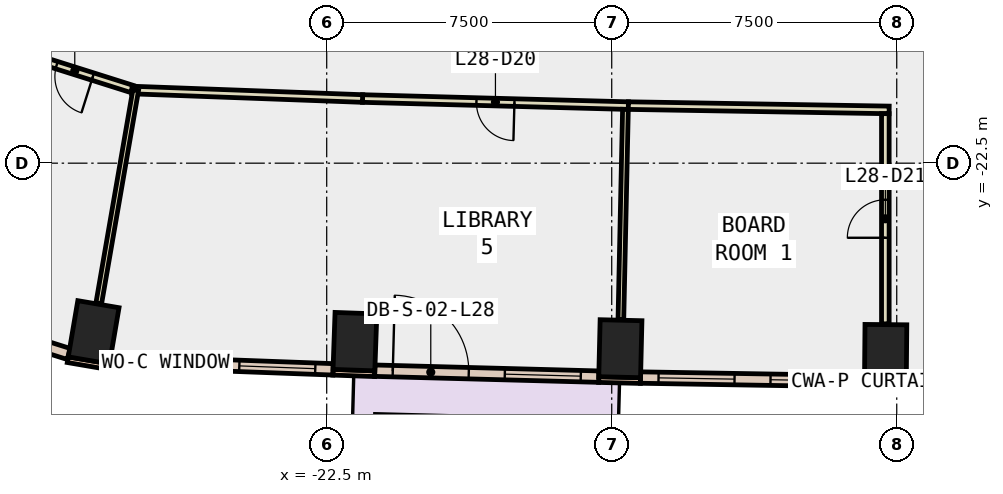
"""IFC4 building model, lengths in metres.
Left out: names, types, materials, properties, quantities, classifications, styles, units other than length and angle.
Written with IfcOpenShell. Run it as: python <this file> out.ifc"""

import sys

from ifc_helpers import new_model, si_unit, direction, frame, frame_2d, origin, origin_2d, place, context, subcontext, project, spatial, rectangle, extrude, element, fill, save


model = new_model("IFC4")
c1 = context("Model", 3, precision=1e-05, world=origin(), true_north=direction((0.0, 1.0)))
c2 = subcontext(c1, "Body", "Model", "MODEL_VIEW")
j1 = project(units=[si_unit("LENGTHUNIT", "METRE"), si_unit("PLANEANGLEUNIT", "RADIAN")], contexts=[c1])
p1 = place(None, origin())
s1 = spatial("IfcSite", under=j1, at=p1, CompositionType="ELEMENT")
p2 = place(p1, origin())
s2 = spatial("IfcBuilding", under=s1, at=p2, CompositionType="ELEMENT")
p3 = place(p2, frame((0.0, 0.0, 128.6)))
s3 = spatial("IfcBuildingStorey", under=s2, at=p3, CompositionType="ELEMENT", Elevation=128.6)
for number, where, z_axis, x_axis in (
    (1, (-28.633, -26.95, -0.4), (0.0, 0.0, 1.0), (-0.986, 0.168, 0.0)),
    (2, (-21.757, -27.196, -0.4), (0.0, 0.0, 1.0), (-0.999, 0.035, 0.0)),
    (3, (-14.773, -27.382, -0.4), (0.0, 0.0, 1.0), (-1.0, 0.024, 0.0)),
    (4, (-7.792, -27.498, -0.4), (0.0, 0.0, 1.0), (-1.0, 0.009, 0.0)),
):
    element("IfcColumn", number, at=place(p3, frame(where, z_axis=z_axis, x_axis=x_axis)), inside=s3, PredefinedType="COLUMN", context=c2, shape_type="SweptSolid", body=[
        extrude(rectangle(XDim=1.1, YDim=1.5, at=origin_2d()), origin(), (0.0, 0.0, 1.0), 4.0),
    ])
p4 = place(p3, frame((-29.314, -27.671, 0.0), z_axis=(0.0, 0.0, 1.0), x_axis=(0.985763338892, -0.168138751323, 0.0)))
e5 = element("IfcWall", 5, at=p4, inside=s3, PredefinedType="STANDARD", context=c2, shape_type="SweptSolid", body=[
    extrude(rectangle(XDim=1.101, YDim=0.15, at=frame_2d((0.55, 0.0))), origin(), (0.0, 0.0, 1.0), 3.6),
])
p5 = place(p3, frame((-22.336, -28.001, 0.0), z_axis=(0.0, 0.0, 1.0), x_axis=(0.999368780235, -0.035525217693, 0.0)))
e6 = element("IfcWall", 6, at=p5, inside=s3, PredefinedType="STANDARD", context=c2, shape_type="SweptSolid", body=[
    extrude(rectangle(XDim=1.1, YDim=0.15, at=frame_2d((0.55, 0.0))), origin(), (0.0, 0.0, 1.0), 3.6),
])
p6 = place(p3, frame((-15.343, -28.194, 0.0), z_axis=(0.0, 0.0, 1.0), x_axis=(0.999723421029, -0.023517683673, 0.0)))
e7 = element("IfcWall", 7, at=p6, inside=s3, PredefinedType="STANDARD", context=c2, shape_type="SweptSolid", body=[
    extrude(rectangle(XDim=1.1, YDim=0.15, at=frame_2d((0.55, 0.0))), origin(), (0.0, 0.0, 1.0), 3.6),
])
p7 = place(p3, frame((-8.349, -28.318, 0.0), z_axis=(0.0, 0.0, 1.0), x_axis=(0.999960601295, -0.008876703074, 0.0)))
e8 = element("IfcWall", 8, at=p7, inside=s3, PredefinedType="STANDARD", context=c2, shape_type="SweptSolid", body=[
    extrude(rectangle(XDim=1.1, YDim=0.15, at=frame_2d((0.55, 0.0))), origin(), (0.0, 0.0, 1.0), 3.6),
])
p8 = place(p3, frame((-28.205, -27.708, 0.0), z_axis=(0.0, 0.0, 1.0), x_axis=(0.999317846462, -0.036930228031, 0.0)))
e9 = element("IfcWall", 9, at=p8, inside=s3, PredefinedType="STANDARD", context=c2, shape_type="SweptSolid", body=[
    extrude(rectangle(XDim=5.877, YDim=0.3, at=frame_2d((2.938, 0.0))), origin(), (0.0, 0.0, 1.0), 3.6),
])
p9 = place(p8, frame((0.469, 0.0, 0.9)))
e10 = element("IfcOpeningElement", 10, at=p9, cuts=e9, PredefinedType="OPENING", context=c2, shape_type="SweptSolid", body=[
    extrude(rectangle(XDim=2.0, YDim=2.6, at=frame_2d((1.0, 1.3))), frame((0.0, 0.16, 0.0), z_axis=(0.0, -1.0, 0.0), x_axis=(1.0, 0.0, 0.0)), (0.0, 0.0, 1.0), 0.32),
])
p10 = place(p8, frame((3.408, 0.0, 0.9)))
e11 = element("IfcOpeningElement", 11, at=p10, cuts=e9, PredefinedType="OPENING", context=c2, shape_type="SweptSolid", body=[
    extrude(rectangle(XDim=2.0, YDim=2.6, at=frame_2d((1.0, 1.3))), frame((0.0, 0.16, 0.0), z_axis=(0.0, -1.0, 0.0), x_axis=(1.0, 0.0, 0.0)), (0.0, 0.0, 1.0), 0.32),
])
p11 = place(p3, frame((-21.235, -27.96, 0.0), z_axis=(0.0, 0.0, 1.0), x_axis=(0.999645618819, -0.026620232457, 0.0)))
e12 = element("IfcWall", 12, at=p11, inside=s3, PredefinedType="STANDARD", context=c2, shape_type="SweptSolid", body=[
    extrude(rectangle(XDim=5.897, YDim=0.3, at=frame_2d((2.949, 0.0))), origin(), (0.0, 0.0, 1.0), 3.6),
])
p12 = place(p11, frame((0.474, 0.0, 0.0)))
e13 = element("IfcOpeningElement", 13, at=p12, cuts=e12, PredefinedType="OPENING", context=c2, shape_type="SweptSolid", body=[
    extrude(rectangle(XDim=2.0, YDim=2.4, at=frame_2d((1.0, 1.2))), frame((0.0, 0.16, 0.0), z_axis=(0.0, -1.0, 0.0), x_axis=(1.0, 0.0, 0.0)), (0.0, 0.0, 1.0), 0.32),
])
p13 = place(p11, frame((3.423, 0.0, 0.9)))
e14 = element("IfcOpeningElement", 14, at=p13, cuts=e12, PredefinedType="OPENING", context=c2, shape_type="SweptSolid", body=[
    extrude(rectangle(XDim=2.0, YDim=2.6, at=frame_2d((1.0, 1.3))), frame((0.0, 0.16, 0.0), z_axis=(0.0, -1.0, 0.0), x_axis=(1.0, 0.0, 0.0)), (0.0, 0.0, 1.0), 0.32),
])
p14 = place(p3, frame((-14.242, -28.141, 0.0), z_axis=(0.0, 0.0, 1.0), x_axis=(0.999862081538, -0.016607766328, 0.0)))
e15 = element("IfcWall", 15, at=p14, inside=s3, PredefinedType="STANDARD", context=c2, shape_type="SweptSolid", body=[
    extrude(rectangle(XDim=5.895, YDim=0.3, at=frame_2d((2.947, 0.0))), origin(), (0.0, 0.0, 1.0), 3.6),
])
p15 = place(p14, frame((0.474, 0.0, 0.9)))
e16 = element("IfcOpeningElement", 16, at=p15, cuts=e15, PredefinedType="OPENING", context=c2, shape_type="SweptSolid", body=[
    extrude(rectangle(XDim=2.0, YDim=2.6, at=frame_2d((1.0, 1.3))), frame((0.0, 0.16, 0.0), z_axis=(0.0, -1.0, 0.0), x_axis=(1.0, 0.0, 0.0)), (0.0, 0.0, 1.0), 0.32),
])
p16 = place(p14, frame((3.421, 0.0, 0.9)))
e17 = element("IfcOpeningElement", 17, at=p16, cuts=e15, PredefinedType="OPENING", context=c2, shape_type="SweptSolid", body=[
    extrude(rectangle(XDim=2.0, YDim=2.6, at=frame_2d((1.0, 1.3))), frame((0.0, 0.16, 0.0), z_axis=(0.0, -1.0, 0.0), x_axis=(1.0, 0.0, 0.0)), (0.0, 0.0, 1.0), 0.32),
])
p17 = place(p3, frame((-33.657, -26.139, 0.0), z_axis=(0.0, 0.0, 1.0), x_axis=(0.953449736988, -0.301551983971, 0.0)))
e18 = element("IfcWall", 18, at=p17, inside=s3, PredefinedType="STANDARD", context=c2, shape_type="SweptSolid", body=[
    extrude(rectangle(XDim=4.583, YDim=0.3, at=frame_2d((2.292, 0.0))), origin(), (0.0, 0.0, 1.0), 3.6),
])
p18 = place(p17, frame((1.592, 0.0, 0.9)))
e19 = element("IfcOpeningElement", 19, at=p18, cuts=e18, PredefinedType="OPENING", context=c2, shape_type="SweptSolid", body=[
    extrude(rectangle(XDim=1.4, YDim=2.6, at=frame_2d((0.7, 1.3))), frame((0.0, 0.16, 0.0), z_axis=(0.0, -1.0, 0.0), x_axis=(1.0, 0.0, 0.0)), (0.0, 0.0, 1.0), 0.32),
])
p19 = place(p3, frame((-27.621, -20.548, 0.0), z_axis=(0.0, 0.0, 1.0), x_axis=(-0.953482354465, 0.301448834338, 0.0)))
e20 = element("IfcWall", 20, at=p19, inside=s3, PredefinedType="PARTITIONING", context=c2, shape_type="SweptSolid", body=[
    extrude(rectangle(XDim=3.165, YDim=0.2, at=frame_2d((1.583, 0.0))), origin(), (0.0, 0.0, 1.0), 3.6),
])
p20 = place(p19, frame((1.082, 0.0, 0.0)))
e21 = element("IfcOpeningElement", 21, at=p20, cuts=e20, PredefinedType="OPENING", context=c2, shape_type="SweptSolid", body=[
    extrude(rectangle(XDim=1.0, YDim=2.1, at=frame_2d((0.5, 1.05))), frame((0.0, 0.11, 0.0), z_axis=(0.0, -1.0, 0.0), x_axis=(1.0, 0.0, 0.0)), (0.0, 0.0, 1.0), 0.22),
])
p21 = place(p3, frame((-14.562, -20.986, 0.0), z_axis=(0.0, 0.0, 1.0), x_axis=(-0.999642796892, 0.026725991498, 0.0)))
e22 = element("IfcWall", 22, at=p21, inside=s3, PredefinedType="PARTITIONING", context=c2, shape_type="SweptSolid", body=[
    extrude(rectangle(XDim=6.997, YDim=0.2, at=frame_2d((3.499, 0.0))), origin(), (0.0, 0.0, 1.0), 3.6),
])
p22 = place(p21, frame((2.999, 0.0, 0.0)))
e23 = element("IfcOpeningElement", 23, at=p22, cuts=e22, PredefinedType="OPENING", context=c2, shape_type="SweptSolid", body=[
    extrude(rectangle(XDim=1.0, YDim=2.1, at=frame_2d((0.5, 1.05))), frame((0.0, 0.11, 0.0), z_axis=(0.0, -1.0, 0.0), x_axis=(1.0, 0.0, 0.0)), (0.0, 0.0, 1.0), 0.22),
])
p23 = place(p3, frame((-21.557, -20.799, 0.0), z_axis=(0.0, 0.0, 1.0), x_axis=(-0.99931884782, 0.036903121698, 0.0)))
e24 = element("IfcWall", 24, at=p23, inside=s3, PredefinedType="PARTITIONING", context=c2, shape_type="SweptSolid", body=[
    extrude(rectangle(XDim=6.073, YDim=0.2, at=frame_2d((3.037, 0.0))), origin(), (0.0, 0.0, 1.0), 3.6),
])
p24 = place(p3, frame((-7.7, -21.099, 0.0), z_axis=(0.0, 0.0, 1.0), x_axis=(-0.999861998162, 0.016612785183, 0.0)))
e25 = element("IfcWall", 25, at=p24, inside=s3, PredefinedType="PARTITIONING", context=c2, shape_type="SweptSolid", body=[
    extrude(rectangle(XDim=6.863, YDim=0.2, at=frame_2d((3.432, 0.0))), origin(), (0.0, 0.0, 1.0), 3.6),
])
p25 = place(p3, frame((-7.8, -26.728, 0.0), z_axis=(0.0, 0.0, 1.0), x_axis=(0.0, 1.0, 0.0)))
e26 = element("IfcWall", 26, at=p25, inside=s3, PredefinedType="PARTITIONING", context=c2, shape_type="SweptSolid", body=[
    extrude(rectangle(XDim=5.531, YDim=0.2, at=frame_2d((2.766, 0.0))), origin(), (0.0, 0.0, 1.0), 3.6),
])
p26 = place(p25, frame((2.265, 0.0, 0.0)))
e27 = element("IfcOpeningElement", 27, at=p26, cuts=e26, PredefinedType="OPENING", context=c2, shape_type="SweptSolid", body=[
    extrude(rectangle(XDim=1.0, YDim=2.1, at=frame_2d((0.5, 1.05))), frame((0.0, 0.11, 0.0), z_axis=(0.0, -1.0, 0.0), x_axis=(1.0, 0.0, 0.0)), (0.0, 0.0, 1.0), 0.22),
])
p27 = place(p3, frame((-27.526, -20.578, 0.0), z_axis=(0.0, 0.0, 1.0), x_axis=(-0.170795043313, -0.985306578269, 0.0)))
e28 = element("IfcWall", 28, at=p27, inside=s3, PredefinedType="PARTITIONING", context=c2, shape_type="SweptSolid", body=[
    extrude(rectangle(XDim=5.698, YDim=0.15, at=frame_2d((2.849, 0.0))), origin(), (0.0, 0.0, 1.0), 3.6),
])
p28 = place(p3, frame((-14.639, -21.084, 0.0), z_axis=(0.0, 0.0, 1.0), x_axis=(-0.021723441989, -0.99976401819, 0.0)))
e29 = element("IfcWall", 29, at=p28, inside=s3, PredefinedType="PARTITIONING", context=c2, shape_type="SweptSolid", body=[
    extrude(rectangle(XDim=5.529, YDim=0.15, at=frame_2d((2.765, 0.0))), origin(), (0.0, 0.0, 1.0), 3.6),
])
p29 = place(p9, origin())
e30 = element("IfcWindow", 30, at=p29, inside=s3, PartitioningType="SINGLE_PANEL", PredefinedType="WINDOW", context=c2, shape_type="SweptSolid", body=[
    extrude(rectangle(XDim=2.0, YDim=2.6, at=frame_2d((1.0, 1.3))), frame((0.0, 0.03, 0.0), z_axis=(0.0, -1.0, 0.0), x_axis=(1.0, 0.0, 0.0)), (0.0, 0.0, 1.0), 0.06),
])
fill(e10, e30)
p30 = place(p10, origin())
e31 = element("IfcWindow", 31, at=p30, inside=s3, PartitioningType="SINGLE_PANEL", PredefinedType="WINDOW", context=c2, shape_type="SweptSolid", body=[
    extrude(rectangle(XDim=2.0, YDim=2.6, at=frame_2d((1.0, 1.3))), frame((0.0, 0.03, 0.0), z_axis=(0.0, -1.0, 0.0), x_axis=(1.0, 0.0, 0.0)), (0.0, 0.0, 1.0), 0.06),
])
fill(e11, e31)
p31 = place(p12, origin())
e32 = element("IfcDoor", 32, at=p31, inside=s3, OperationType="SLIDING_TO_LEFT", PredefinedType="DOOR", context=c2, shape_type="SweptSolid", body=[
    extrude(rectangle(XDim=2.0, YDim=2.4, at=frame_2d((1.0, 1.2))), frame((0.0, 0.025, 0.0), z_axis=(0.0, -1.0, 0.0), x_axis=(1.0, 0.0, 0.0)), (0.0, 0.0, 1.0), 0.05),
])
fill(e13, e32)
p32 = place(p13, origin())
e33 = element("IfcWindow", 33, at=p32, inside=s3, PartitioningType="SINGLE_PANEL", PredefinedType="WINDOW", context=c2, shape_type="SweptSolid", body=[
    extrude(rectangle(XDim=2.0, YDim=2.6, at=frame_2d((1.0, 1.3))), frame((0.0, 0.03, 0.0), z_axis=(0.0, -1.0, 0.0), x_axis=(1.0, 0.0, 0.0)), (0.0, 0.0, 1.0), 0.06),
])
fill(e14, e33)
p33 = place(p15, origin())
e34 = element("IfcWindow", 34, at=p33, inside=s3, PartitioningType="SINGLE_PANEL", PredefinedType="WINDOW", context=c2, shape_type="SweptSolid", body=[
    extrude(rectangle(XDim=2.0, YDim=2.6, at=frame_2d((1.0, 1.3))), frame((0.0, 0.03, 0.0), z_axis=(0.0, -1.0, 0.0), x_axis=(1.0, 0.0, 0.0)), (0.0, 0.0, 1.0), 0.06),
])
fill(e16, e34)
p34 = place(p16, origin())
e35 = element("IfcWindow", 35, at=p34, inside=s3, PartitioningType="SINGLE_PANEL", PredefinedType="WINDOW", context=c2, shape_type="SweptSolid", body=[
    extrude(rectangle(XDim=2.0, YDim=2.6, at=frame_2d((1.0, 1.3))), frame((0.0, 0.03, 0.0), z_axis=(0.0, -1.0, 0.0), x_axis=(1.0, 0.0, 0.0)), (0.0, 0.0, 1.0), 0.06),
])
fill(e17, e35)
p35 = place(p20, origin())
e36 = element("IfcDoor", 36, at=p35, inside=s3, OperationType="SINGLE_SWING_RIGHT", PredefinedType="DOOR", context=c2, shape_type="SweptSolid", body=[
    extrude(rectangle(XDim=1.0, YDim=2.1, at=frame_2d((0.5, 1.05))), frame((0.0, 0.025, 0.0), z_axis=(0.0, -1.0, 0.0), x_axis=(1.0, 0.0, 0.0)), (0.0, 0.0, 1.0), 0.05),
])
fill(e21, e36)
p36 = place(p22, origin())
e37 = element("IfcDoor", 37, at=p36, inside=s3, OperationType="SINGLE_SWING_LEFT", PredefinedType="DOOR", context=c2, shape_type="SweptSolid", body=[
    extrude(rectangle(XDim=1.0, YDim=2.1, at=frame_2d((0.5, 1.05))), frame((0.0, 0.025, 0.0), z_axis=(0.0, -1.0, 0.0), x_axis=(1.0, 0.0, 0.0)), (0.0, 0.0, 1.0), 0.05),
])
fill(e23, e37)
p37 = place(p26, origin())
e38 = element("IfcDoor", 38, at=p37, inside=s3, OperationType="SINGLE_SWING_LEFT", PredefinedType="DOOR", context=c2, shape_type="SweptSolid", body=[
    extrude(rectangle(XDim=1.0, YDim=2.1, at=frame_2d((0.5, 1.05))), frame((0.0, 0.025, 0.0), z_axis=(0.0, -1.0, 0.0), x_axis=(1.0, 0.0, 0.0)), (0.0, 0.0, 1.0), 0.05),
])
fill(e27, e38)
save(model, sys.argv[1])
